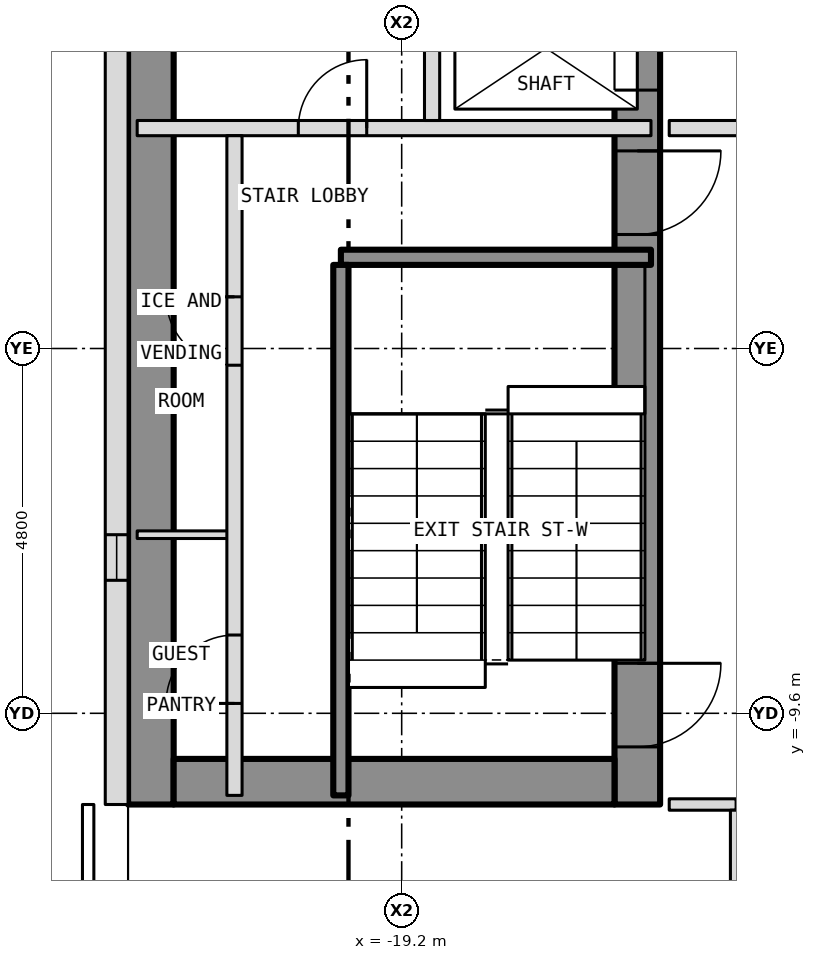
"""IFC4 building model, lengths in metres.
Left out: names, types, materials, properties, quantities, classifications, styles, units other than length and angle.
Written with IfcOpenShell. Run it as: python <this file> out.ifc"""

import sys

from ifc_helpers import new_model, si_unit, direction, frame, frame_2d, origin, place, context, subcontext, project, spatial, rectangle, extrude, element, fill, save


model = new_model("IFC4")
c1 = context("Model", 3, precision=1e-05, world=origin(), true_north=direction((0.0, 1.0)))
c2 = subcontext(c1, "Body", "Model", "MODEL_VIEW")
j1 = project(units=[si_unit("LENGTHUNIT", "METRE"), si_unit("PLANEANGLEUNIT", "RADIAN")], contexts=[c1])
p1 = place(None, origin())
s1 = spatial("IfcSite", under=j1, at=p1, CompositionType="ELEMENT")
p2 = place(p1, origin())
s2 = spatial("IfcBuilding", under=s1, at=p2, CompositionType="ELEMENT")
p3 = place(p2, frame((0.0, 0.0, 131.0)))
s3 = spatial("IfcBuildingStorey", under=s2, at=p3, CompositionType="ELEMENT", Elevation=131.0)
p4 = place(p3, frame((-16.1, -10.8, 0.0), z_axis=(0.0, 0.0, 1.0), x_axis=(0.0, 1.0, 0.0)))
e1 = element("IfcWall", 1, at=p4, inside=s3, PredefinedType="SHEAR", context=c2, shape_type="SweptSolid", body=[
    extrude(rectangle(XDim=21.6, YDim=0.6, at=frame_2d((10.8, 0.0))), origin(), (0.0, 0.0, 1.0), 3.25),
])
p5 = place(p4, frame((9.4, 0.0, 0.0)))
e2 = element("IfcOpeningElement", 2, at=p5, cuts=e1, PredefinedType="OPENING", context=c2, shape_type="SweptSolid", body=[
    extrude(rectangle(XDim=1.1, YDim=2.1, at=frame_2d((0.55, 1.05))), frame((0.0, 0.312, 0.0), z_axis=(0.0, -1.0, 0.0), x_axis=(1.0, 0.0, 0.0)), (0.0, 0.0, 1.0), 0.624),
])
p6 = place(p4, frame((11.5, 0.0, 0.0)))
e3 = element("IfcOpeningElement", 3, at=p6, cuts=e1, PredefinedType="OPENING", context=c2, shape_type="SweptSolid", body=[
    extrude(rectangle(XDim=1.1, YDim=2.1, at=frame_2d((0.55, 1.05))), frame((0.0, 0.312, 0.0), z_axis=(0.0, -1.0, 0.0), x_axis=(1.0, 0.0, 0.0)), (0.0, 0.0, 1.0), 0.624),
])
p7 = place(p4, frame((13.6, 0.0, 0.0)))
e4 = element("IfcOpeningElement", 4, at=p7, cuts=e1, PredefinedType="OPENING", context=c2, shape_type="SweptSolid", body=[
    extrude(rectangle(XDim=1.1, YDim=2.1, at=frame_2d((0.55, 1.05))), frame((0.0, 0.312, 0.0), z_axis=(0.0, -1.0, 0.0), x_axis=(1.0, 0.0, 0.0)), (0.0, 0.0, 1.0), 0.624),
])
p8 = place(p4, frame((15.7, 0.0, 0.0)))
e5 = element("IfcOpeningElement", 5, at=p8, cuts=e1, PredefinedType="OPENING", context=c2, shape_type="SweptSolid", body=[
    extrude(rectangle(XDim=1.1, YDim=2.1, at=frame_2d((0.55, 1.05))), frame((0.0, 0.312, 0.0), z_axis=(0.0, -1.0, 0.0), x_axis=(1.0, 0.0, 0.0)), (0.0, 0.0, 1.0), 0.624),
])
p9 = place(p4, frame((17.8, 0.0, 0.0)))
e6 = element("IfcOpeningElement", 6, at=p9, cuts=e1, PredefinedType="OPENING", context=c2, shape_type="SweptSolid", body=[
    extrude(rectangle(XDim=1.1, YDim=2.1, at=frame_2d((0.55, 1.05))), frame((0.0, 0.312, 0.0), z_axis=(0.0, -1.0, 0.0), x_axis=(1.0, 0.0, 0.0)), (0.0, 0.0, 1.0), 0.624),
])
p10 = place(p4, frame((0.758, 0.0, 0.0)))
e7 = element("IfcOpeningElement", 7, at=p10, cuts=e1, PredefinedType="OPENING", context=c2, shape_type="SweptSolid", body=[
    extrude(rectangle(XDim=1.1, YDim=2.1, at=frame_2d((0.55, 1.05))), frame((0.0, 0.312, 0.0), z_axis=(0.0, -1.0, 0.0), x_axis=(1.0, 0.0, 0.0)), (0.0, 0.0, 1.0), 0.624),
])
p11 = place(p4, frame((7.5, 0.0, 0.0)))
e8 = element("IfcOpeningElement", 8, at=p11, cuts=e1, PredefinedType="OPENING", context=c2, shape_type="SweptSolid", body=[
    extrude(rectangle(XDim=1.1, YDim=2.1, at=frame_2d((0.55, 1.05))), frame((0.0, 0.312, 0.0), z_axis=(0.0, -1.0, 0.0), x_axis=(1.0, 0.0, 0.0)), (0.0, 0.0, 1.0), 0.624),
])
p12 = place(p3, frame((-22.5, -10.8, 0.0), z_axis=(0.0, 0.0, 1.0), x_axis=(0.0, 1.0, 0.0)))
e9 = element("IfcWall", 9, at=p12, inside=s3, PredefinedType="SHEAR", context=c2, shape_type="SweptSolid", body=[
    extrude(rectangle(XDim=21.6, YDim=0.6, at=frame_2d((10.8, 0.0))), origin(), (0.0, 0.0, 1.0), 3.25),
])
p13 = place(p3, frame((-22.2, -10.5, 0.0), z_axis=(0.0, 0.0, 1.0), x_axis=(1.0, 0.0, 0.0)))
e10 = element("IfcWall", 10, at=p13, inside=s3, PredefinedType="SHEAR", context=c2, shape_type="SweptSolid", body=[
    extrude(rectangle(XDim=5.8, YDim=0.6, at=frame_2d((2.9, 0.0))), origin(), (0.0, 0.0, 1.0), 3.25),
])
p14 = place(p3, frame((-22.95, 10.8, 0.0), z_axis=(0.0, 0.0, 1.0), x_axis=(0.0, -1.0, 0.0)))
e11 = element("IfcWall", 11, at=p14, inside=s3, PredefinedType="SOLIDWALL", context=c2, shape_type="SweptSolid", body=[
    extrude(rectangle(XDim=21.6, YDim=0.3, at=frame_2d((10.8, 0.0))), origin(), (0.0, 0.0, 1.0), 3.5),
])
p15 = place(p14, frame((18.05, 0.0, 1.0)))
e12 = element("IfcOpeningElement", 12, at=p15, cuts=e11, PredefinedType="OPENING", context=c2, shape_type="SweptSolid", body=[
    extrude(rectangle(XDim=0.6, YDim=1.5, at=frame_2d((0.3, 0.75))), frame((0.0, 0.162, 0.0), z_axis=(0.0, -1.0, 0.0), x_axis=(1.0, 0.0, 0.0)), (0.0, 0.0, 1.0), 0.324),
])
p16 = place(p3, frame((-15.68, -10.8, 0.0), z_axis=(0.0, 0.0, 1.0), x_axis=(1.0, 0.0, 0.0)))
e13 = element("IfcWall", 13, at=p16, inside=s3, PredefinedType="PARTITIONING", context=c2, shape_type="SweptSolid", body=[
    extrude(rectangle(XDim=0.88, YDim=0.15, at=frame_2d((0.44, 0.0))), origin(), (0.0, 0.0, 1.0), 3.35),
])
p17 = place(p3, frame((-22.68, -7.25, 0.0), z_axis=(0.0, 0.0, 1.0), x_axis=(1.0, 0.0, 0.0)))
e14 = element("IfcWall", 14, at=p17, inside=s3, PredefinedType="PARTITIONING", context=c2, shape_type="SweptSolid", body=[
    extrude(rectangle(XDim=1.28, YDim=0.1, at=frame_2d((0.64, 0.0))), origin(), (0.0, 0.0, 1.0), 3.25),
])
p18 = place(p3, frame((-20.0, -3.6, 0.0), z_axis=(0.0, 0.0, 1.0), x_axis=(1.0, 0.0, 0.0)))
e15 = element("IfcWall", 15, at=p18, inside=s3, PredefinedType="SHEAR", context=c2, shape_type="SweptSolid", body=[
    extrude(rectangle(XDim=4.08, YDim=0.2, at=frame_2d((2.04, 0.0))), origin(), (0.0, 0.0, 1.0), 3.25),
])
p19 = place(p3, frame((-22.68, -1.9, 0.0), z_axis=(0.0, 0.0, 1.0), x_axis=(1.0, 0.0, 0.0)))
e16 = element("IfcWall", 16, at=p19, inside=s3, PredefinedType="PARTITIONING", context=c2, shape_type="SweptSolid", body=[
    extrude(rectangle(XDim=6.76, YDim=0.2, at=frame_2d((3.38, 0.0))), origin(), (0.0, 0.0, 1.0), 3.25),
])
p20 = place(p19, frame((2.12, 0.0, 0.0)))
e17 = element("IfcOpeningElement", 17, at=p20, cuts=e16, PredefinedType="OPENING", context=c2, shape_type="SweptSolid", body=[
    extrude(rectangle(XDim=0.9, YDim=2.1, at=frame_2d((0.45, 1.05))), frame((0.0, 0.112, 0.0), z_axis=(0.0, -1.0, 0.0), x_axis=(1.0, 0.0, 0.0)), (0.0, 0.0, 1.0), 0.224),
])
p21 = place(p3, frame((-15.68, -1.9, 0.0), z_axis=(0.0, 0.0, 1.0), x_axis=(1.0, 0.0, 0.0)))
e18 = element("IfcWall", 18, at=p21, inside=s3, PredefinedType="PARTITIONING", context=c2, shape_type="SweptSolid", body=[
    extrude(rectangle(XDim=3.28, YDim=0.2, at=frame_2d((1.64, 0.0))), origin(), (0.0, 0.0, 1.0), 3.35),
])
p22 = place(p21, frame((0.94, 0.0, 0.0)))
e19 = element("IfcOpeningElement", 19, at=p22, cuts=e18, PredefinedType="OPENING", context=c2, shape_type="SweptSolid", body=[
    extrude(rectangle(XDim=1.1, YDim=2.1, at=frame_2d((0.55, 1.05))), frame((0.0, 0.112, 0.0), z_axis=(0.0, -1.0, 0.0), x_axis=(1.0, 0.0, 0.0)), (0.0, 0.0, 1.0), 0.224),
])
p23 = place(p3, frame((-21.4, -10.68, 0.0), z_axis=(0.0, 0.0, 1.0), x_axis=(0.0, 1.0, 0.0)))
e20 = element("IfcWall", 20, at=p23, inside=s3, PredefinedType="PARTITIONING", context=c2, shape_type="SweptSolid", body=[
    extrude(rectangle(XDim=8.68, YDim=0.2, at=frame_2d((4.34, 0.0))), origin(), (0.0, 0.0, 1.0), 3.25),
])
p24 = place(p23, frame((1.21, 0.0, 0.0)))
e21 = element("IfcOpeningElement", 21, at=p24, cuts=e20, PredefinedType="OPENING", context=c2, shape_type="SweptSolid", body=[
    extrude(rectangle(XDim=0.9, YDim=2.1, at=frame_2d((0.45, 1.05))), frame((0.0, 0.112, 0.0), z_axis=(0.0, -1.0, 0.0), x_axis=(1.0, 0.0, 0.0)), (0.0, 0.0, 1.0), 0.224),
])
p25 = place(p23, frame((5.66, 0.0, 0.0)))
e22 = element("IfcOpeningElement", 22, at=p25, cuts=e20, PredefinedType="OPENING", context=c2, shape_type="SweptSolid", body=[
    extrude(rectangle(XDim=0.9, YDim=2.1, at=frame_2d((0.45, 1.05))), frame((0.0, 0.112, 0.0), z_axis=(0.0, -1.0, 0.0), x_axis=(1.0, 0.0, 0.0)), (0.0, 0.0, 1.0), 0.224),
])
p26 = place(p3, frame((-20.0, -10.68, 0.0), z_axis=(0.0, 0.0, 1.0), x_axis=(0.0, 1.0, 0.0)))
e23 = element("IfcWall", 23, at=p26, inside=s3, PredefinedType="SHEAR", context=c2, shape_type="SweptSolid", body=[
    extrude(rectangle(XDim=6.98, YDim=0.2, at=frame_2d((3.49, 0.0))), origin(), (0.0, 0.0, 1.0), 3.25),
])
p27 = place(p3, frame((-18.8, -1.8, 0.0), z_axis=(0.0, 0.0, 1.0), x_axis=(0.0, 1.0, 0.0)))
e24 = element("IfcWall", 24, at=p27, inside=s3, PredefinedType="PARTITIONING", context=c2, shape_type="SweptSolid", body=[
    extrude(rectangle(XDim=6.15, YDim=0.2, at=frame_2d((3.075, 0.0))), origin(), (0.0, 0.0, 1.0), 3.25),
])
p28 = place(p3, frame((-14.8, -14.725, 0.0), z_axis=(0.0, 0.0, 1.0), x_axis=(0.0, 1.0, 0.0)))
e25 = element("IfcWall", 25, at=p28, inside=s3, PredefinedType="PARTITIONING", context=c2, shape_type="SweptSolid", body=[
    extrude(rectangle(XDim=3.85, YDim=0.15, at=frame_2d((1.925, 0.0))), origin(), (0.0, 0.0, 1.0), 3.35),
])
p29 = place(p28, frame((0.525, 0.0, 0.0)))
e26 = element("IfcOpeningElement", 26, at=p29, cuts=e25, PredefinedType="OPENING", context=c2, shape_type="SweptSolid", body=[
    extrude(rectangle(XDim=1.0, YDim=2.1, at=frame_2d((0.5, 1.05))), frame((0.0, 0.087, 0.0), z_axis=(0.0, -1.0, 0.0), x_axis=(1.0, 0.0, 0.0)), (0.0, 0.0, 1.0), 0.174),
])
p30 = place(p15, origin())
e27 = element("IfcWindow", 27, at=p30, inside=s3, PartitioningType="SINGLE_PANEL", PredefinedType="WINDOW", context=c2, shape_type="SweptSolid", body=[
    extrude(rectangle(XDim=0.6, YDim=1.5, at=frame_2d((0.3, 0.75))), frame((0.0, -0.06, 0.0), z_axis=(0.0, -1.0, 0.0), x_axis=(1.0, 0.0, 0.0)), (0.0, 0.0, 1.0), 0.06),
])
fill(e12, e27)
p31 = place(p5, origin())
e28 = element("IfcDoor", 28, at=p31, inside=s3, OperationType="SLIDING_TO_LEFT", PredefinedType="DOOR", context=c2, shape_type="SweptSolid", body=[
    extrude(rectangle(XDim=1.1, YDim=2.1, at=frame_2d((0.55, 1.05))), frame((0.0, 0.025, 0.0), z_axis=(0.0, -1.0, 0.0), x_axis=(1.0, 0.0, 0.0)), (0.0, 0.0, 1.0), 0.05),
])
fill(e2, e28)
p32 = place(p10, origin())
e29 = element("IfcDoor", 29, at=p32, inside=s3, OperationType="SINGLE_SWING_RIGHT", PredefinedType="DOOR", context=c2, shape_type="SweptSolid", body=[
    extrude(rectangle(XDim=1.1, YDim=2.1, at=frame_2d((0.55, 1.05))), frame((0.0, 0.025, 0.0), z_axis=(0.0, -1.0, 0.0), x_axis=(1.0, 0.0, 0.0)), (0.0, 0.0, 1.0), 0.05),
])
fill(e7, e29)
p33 = place(p11, origin())
e30 = element("IfcDoor", 30, at=p33, inside=s3, OperationType="SINGLE_SWING_RIGHT", PredefinedType="DOOR", context=c2, shape_type="SweptSolid", body=[
    extrude(rectangle(XDim=1.1, YDim=2.1, at=frame_2d((0.55, 1.05))), frame((0.0, 0.025, 0.0), z_axis=(0.0, -1.0, 0.0), x_axis=(1.0, 0.0, 0.0)), (0.0, 0.0, 1.0), 0.05),
])
fill(e8, e30)
p34 = place(p24, origin())
e31 = element("IfcDoor", 31, at=p34, inside=s3, OperationType="SINGLE_SWING_LEFT", PredefinedType="DOOR", context=c2, shape_type="SweptSolid", body=[
    extrude(rectangle(XDim=0.9, YDim=2.1, at=frame_2d((0.45, 1.05))), frame((0.0, 0.025, 0.0), z_axis=(0.0, -1.0, 0.0), x_axis=(1.0, 0.0, 0.0)), (0.0, 0.0, 1.0), 0.05),
])
fill(e21, e31)
p35 = place(p25, origin())
e32 = element("IfcDoor", 32, at=p35, inside=s3, OperationType="SINGLE_SWING_RIGHT", PredefinedType="DOOR", context=c2, shape_type="SweptSolid", body=[
    extrude(rectangle(XDim=0.9, YDim=2.1, at=frame_2d((0.45, 1.05))), frame((0.0, 0.025, 0.0), z_axis=(0.0, -1.0, 0.0), x_axis=(1.0, 0.0, 0.0)), (0.0, 0.0, 1.0), 0.05),
])
fill(e22, e32)
p36 = place(p20, origin())
e33 = element("IfcDoor", 33, at=p36, inside=s3, OperationType="SINGLE_SWING_RIGHT", PredefinedType="DOOR", context=c2, shape_type="SweptSolid", body=[
    extrude(rectangle(XDim=0.9, YDim=2.1, at=frame_2d((0.45, 1.05))), frame((0.0, 0.025, 0.0), z_axis=(0.0, -1.0, 0.0), x_axis=(1.0, 0.0, 0.0)), (0.0, 0.0, 1.0), 0.05),
])
fill(e17, e33)
save(model, sys.argv[1])
